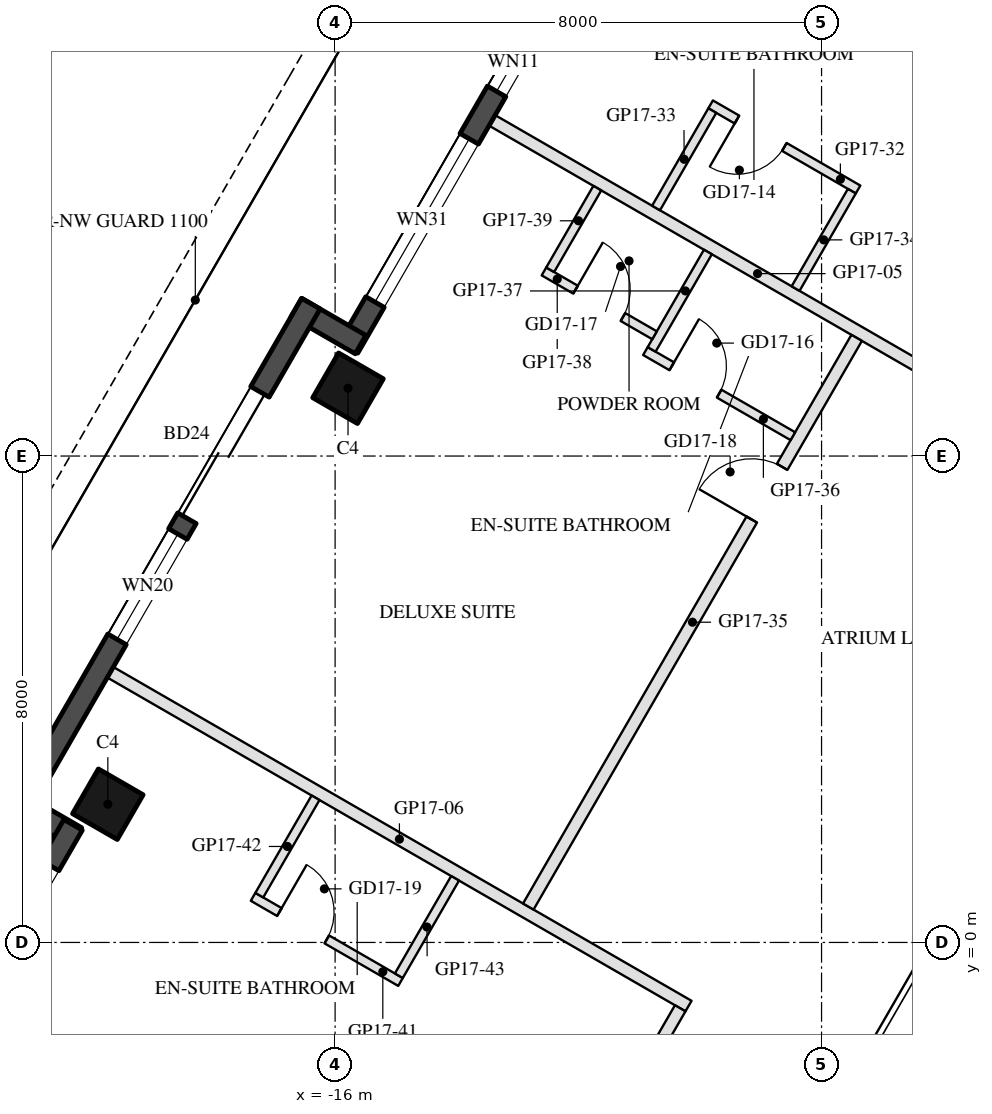
"""IFC4 building model, lengths in metres.
Left out: names, types, materials, properties, quantities, classifications, styles, units other than length and angle.
Written with IfcOpenShell. Run it as: python <this file> out.ifc"""

import sys

from ifc_helpers import new_model, si_unit, direction, frame, frame_2d, origin, origin_2d, place, context, subcontext, project, spatial, rectangle, hollow_rectangle, extrude, element, fill, save


model = new_model("IFC4")
c1 = context("Model", 3, precision=1e-05, world=origin(), true_north=direction((0.0, 1.0)))
c2 = subcontext(c1, "Body", "Model", "MODEL_VIEW")
j1 = project(units=[si_unit("LENGTHUNIT", "METRE"), si_unit("PLANEANGLEUNIT", "RADIAN")], contexts=[c1])
p1 = place(None, origin())
s1 = spatial("IfcSite", under=j1, at=p1, CompositionType="ELEMENT")
p2 = place(p1, origin())
s2 = spatial("IfcBuilding", under=s1, at=p2, CompositionType="ELEMENT")
p3 = place(p2, frame((0.0, 0.0, 183.6)))
s3 = spatial("IfcBuildingStorey", under=s2, at=p3, CompositionType="ELEMENT", Elevation=183.6)
for number, where, z_axis, x_axis in (
    (1, (-15.788, 9.115, 0.0), (0.0, 0.0, 1.0), (0.5, 0.866, 0.0)),
    (2, (-19.738, 2.273, 0.0), (0.0, 0.0, 1.0), (0.5, 0.866, 0.0)),
):
    element("IfcColumn", number, at=place(p3, frame(where, z_axis=z_axis, x_axis=x_axis)), inside=s3, PredefinedType="COLUMN", context=c2, shape_type="SweptSolid", body=[
        extrude(hollow_rectangle(XDim=0.85, YDim=0.85, WallThickness=0.04, at=origin_2d()), origin(), (0.0, 0.0, 1.0), 3.7),
    ])
p4 = place(p3, frame((-12.409, 15.617, 0.0), z_axis=(0.0, 0.0, 1.0), x_axis=(-0.500003597184, -0.866023326939, 0.0)))
e3 = element("IfcWall", 3, at=p4, inside=s3, PredefinedType="SOLIDWALL", context=c2, shape_type="SweptSolid", body=[
    extrude(rectangle(XDim=6.74, YDim=0.35, at=frame_2d((3.37, 0.0))), origin(), (0.0, 0.0, 1.0), 3.55),
])
p5 = place(p4, frame((0.77, 0.0, 0.3)))
e4 = element("IfcOpeningElement", 4, at=p5, cuts=e3, PredefinedType="OPENING", context=c2, shape_type="SweptSolid", body=[
    extrude(rectangle(XDim=1.1, YDim=2.65, at=frame_2d((0.55, 1.325))), frame((0.0, 0.185, 0.0), z_axis=(0.0, -1.0, 0.0), x_axis=(1.0, 0.0, 0.0)), (0.0, 0.0, 1.0), 0.37),
])
p6 = place(p4, frame((2.77, 0.0, 0.3)))
e5 = element("IfcOpeningElement", 5, at=p6, cuts=e3, PredefinedType="OPENING", context=c2, shape_type="SweptSolid", body=[
    extrude(rectangle(XDim=3.1, YDim=2.65, at=frame_2d((1.55, 1.325))), frame((0.0, 0.185, 0.0), z_axis=(0.0, -1.0, 0.0), x_axis=(1.0, 0.0, 0.0)), (0.0, 0.0, 1.0), 0.37),
])
p7 = place(p3, frame((-15.581, 9.833, 0.0), z_axis=(0.0, 0.0, 1.0), x_axis=(-0.866055662726, 0.499947586314, 0.0)))
e6 = element("IfcWall", 6, at=p7, inside=s3, PredefinedType="SOLIDWALL", context=c2, shape_type="SweptSolid", body=[
    extrude(rectangle(XDim=1.22, YDim=0.35, at=frame_2d((0.61, 0.0))), origin(), (0.0, 0.0, 1.0), 3.55),
])
p8 = place(p3, frame((-16.398, 10.507, 0.0), z_axis=(0.0, 0.0, 1.0), x_axis=(-0.499999142773, -0.866025898704, 0.0)))
e7 = element("IfcWall", 7, at=p8, inside=s3, PredefinedType="SOLIDWALL", context=c2, shape_type="SweptSolid", body=[
    extrude(rectangle(XDim=9.7, YDim=0.35, at=frame_2d((4.85, 0.0))), origin(), (0.0, 0.0, 1.0), 3.55),
])
p9 = place(p8, frame((1.675, 0.0, 0.0)))
e8 = element("IfcOpeningElement", 8, at=p9, cuts=e7, PredefinedType="OPENING", context=c2, shape_type="SweptSolid", body=[
    extrude(rectangle(XDim=2.4, YDim=2.4, at=frame_2d((1.2, 1.2))), frame((0.0, 0.185, 0.0), z_axis=(0.0, -1.0, 0.0), x_axis=(1.0, 0.0, 0.0)), (0.0, 0.0, 1.0), 0.37),
])
p10 = place(p8, frame((4.375, 0.0, 0.3)))
e9 = element("IfcOpeningElement", 9, at=p10, cuts=e7, PredefinedType="OPENING", context=c2, shape_type="SweptSolid", body=[
    extrude(rectangle(XDim=2.0, YDim=2.65, at=frame_2d((1.0, 1.325))), frame((0.0, 0.185, 0.0), z_axis=(0.0, -1.0, 0.0), x_axis=(1.0, 0.0, 0.0)), (0.0, 0.0, 1.0), 0.37),
])
p11 = place(p3, frame((-21.312, 2.346, 0.0), z_axis=(0.0, 0.0, 1.0), x_axis=(0.866005645448, -0.500034220881, 0.0)))
e10 = element("IfcWall", 10, at=p11, inside=s3, PredefinedType="SOLIDWALL", context=c2, shape_type="SweptSolid", body=[
    extrude(rectangle(XDim=1.22, YDim=0.35, at=frame_2d((0.61, 0.0))), origin(), (0.0, 0.0, 1.0), 3.55),
])
p12 = place(p3, frame((-20.309, 1.934, 0.0), z_axis=(0.0, 0.0, 1.0), x_axis=(-0.499992114976, -0.866029956157, 0.0)))
e11 = element("IfcWall", 11, at=p12, inside=s3, PredefinedType="SOLIDWALL", context=c2, shape_type="SweptSolid", body=[
    extrude(rectangle(XDim=6.74, YDim=0.35, at=frame_2d((3.37, 0.0))), origin(), (0.0, 0.0, 1.0), 3.55),
])
p13 = place(p12, frame((4.02, 0.0, 0.0)))
e12 = element("IfcOpeningElement", 12, at=p13, cuts=e11, PredefinedType="OPENING", context=c2, shape_type="SweptSolid", body=[
    extrude(rectangle(XDim=2.4, YDim=2.4, at=frame_2d((1.2, 1.2))), frame((0.0, 0.185, 0.0), z_axis=(0.0, -1.0, 0.0), x_axis=(1.0, 0.0, 0.0)), (0.0, 0.0, 1.0), 0.37),
])
p14 = place(p12, frame((0.77, 0.0, 0.3)))
e13 = element("IfcOpeningElement", 13, at=p14, cuts=e11, PredefinedType="OPENING", context=c2, shape_type="SweptSolid", body=[
    extrude(rectangle(XDim=2.9, YDim=2.65, at=frame_2d((1.45, 1.325))), frame((0.0, 0.185, 0.0), z_axis=(0.0, -1.0, 0.0), x_axis=(1.0, 0.0, 0.0)), (0.0, 0.0, 1.0), 0.37),
])
p15 = place(p3, frame((-13.417, 13.52, 0.0), z_axis=(0.0, 0.0, 1.0), x_axis=(0.866022637375, -0.500004791531, 0.0)))
e14 = element("IfcWall", 14, at=p15, inside=s3, PredefinedType="PARTITIONING", context=c2, shape_type="SweptSolid", body=[
    extrude(rectangle(XDim=10.08, YDim=0.2, at=frame_2d((5.04, 0.0))), origin(), (0.0, 0.0, 1.0), 3.06),
])
p16 = place(p3, frame((-19.697, 4.444, 0.0), z_axis=(0.0, 0.0, 1.0), x_axis=(0.866027479907, -0.499996404033, 0.0)))
e15 = element("IfcWall", 15, at=p16, inside=s3, PredefinedType="PARTITIONING", context=c2, shape_type="SweptSolid", body=[
    extrude(rectangle(XDim=10.98, YDim=0.2, at=frame_2d((5.49, 0.0))), origin(), (0.0, 0.0, 1.0), 3.06),
])
p17 = place(p3, frame((-7.399, 12.384, 0.0), z_axis=(0.0, 0.0, 1.0), x_axis=(-0.866034573852, 0.49998411664, 0.0)))
e16 = element("IfcWall", 16, at=p17, inside=s3, PredefinedType="PARTITIONING", context=c2, shape_type="SweptSolid", body=[
    extrude(rectangle(XDim=2.8, YDim=0.15, at=frame_2d((1.4, 0.0))), origin(), (0.0, 0.0, 1.0), 3.55),
])
p18 = place(p17, frame((1.4, 0.0, 0.0)))
e17 = element("IfcOpeningElement", 17, at=p18, cuts=e16, PredefinedType="OPENING", context=c2, shape_type="SweptSolid", body=[
    extrude(rectangle(XDim=0.9, YDim=2.1, at=frame_2d((0.45, 1.05))), frame((0.0, 0.085, 0.0), z_axis=(0.0, -1.0, 0.0), x_axis=(1.0, 0.0, 0.0)), (0.0, 0.0, 1.0), 0.17),
])
for number, where, z_axis, x_axis in (
    (18, (-9.797, 13.681, 0.0), (0.0, 0.0, 1.0), (-0.5, -0.866, 0.0)),
    (19, (-7.502, 12.356, 0.0), (0.0, 0.0, 1.0), (-0.5, -0.866, 0.0)),
):
    element("IfcWall", number, at=place(p3, frame(where, z_axis=z_axis, x_axis=x_axis)), inside=s3, PredefinedType="PARTITIONING", context=c2, shape_type="SweptSolid", body=[
        extrude(rectangle(XDim=1.85, YDim=0.15, at=frame_2d((0.925, 0.0))), origin(), (0.0, 0.0, 1.0), 3.55),
    ])
p19 = place(p3, frame((-12.823, 0.591, 0.0), z_axis=(0.0, 0.0, 1.0), x_axis=(0.500012057535, 0.866018442252, 0.0)))
e20 = element("IfcWall", 20, at=p19, inside=s3, PredefinedType="PARTITIONING", context=c2, shape_type="SweptSolid", body=[
    extrude(rectangle(XDim=10.8, YDim=0.2, at=frame_2d((5.4, 0.0))), origin(), (0.0, 0.0, 1.0), 2.95),
])
p20 = place(p19, frame((7.35, 0.0, 0.0)))
e21 = element("IfcOpeningElement", 21, at=p20, cuts=e20, PredefinedType="OPENING", context=c2, shape_type="SweptSolid", body=[
    extrude(rectangle(XDim=1.0, YDim=2.1, at=frame_2d((0.5, 1.05))), frame((0.0, 0.11, 0.0), z_axis=(0.0, -1.0, 0.0), x_axis=(1.0, 0.0, 0.0)), (0.0, 0.0, 1.0), 0.22),
])
p21 = place(p3, frame((-10.897, 9.726, 0.0), z_axis=(0.0, 0.0, 1.0), x_axis=(0.866056369097, -0.49994636267, 0.0)))
e22 = element("IfcWall", 22, at=p21, inside=s3, PredefinedType="PARTITIONING", context=c2, shape_type="SweptSolid", body=[
    extrude(rectangle(XDim=2.8, YDim=0.15, at=frame_2d((1.4, 0.0))), origin(), (0.0, 0.0, 1.0), 3.55),
])
p22 = place(p21, frame((0.5, 0.0, 0.0)))
e23 = element("IfcOpeningElement", 23, at=p22, cuts=e22, PredefinedType="OPENING", context=c2, shape_type="SweptSolid", body=[
    extrude(rectangle(XDim=0.9, YDim=2.1, at=frame_2d((0.45, 1.05))), frame((0.0, 0.085, 0.0), z_axis=(0.0, -1.0, 0.0), x_axis=(1.0, 0.0, 0.0)), (0.0, 0.0, 1.0), 0.17),
])
p23 = place(p3, frame((-9.869, 11.356, 0.0), z_axis=(0.0, 0.0, 1.0), x_axis=(-0.500042316284, -0.866000971088, 0.0)))
e24 = element("IfcWall", 24, at=p23, inside=s3, PredefinedType="PARTITIONING", context=c2, shape_type="SweptSolid", body=[
    extrude(rectangle(XDim=1.85, YDim=0.15, at=frame_2d((0.925, 0.0))), origin(), (0.0, 0.0, 1.0), 2.95),
])
p24 = place(p3, frame((-12.565, 11.036, 0.0), z_axis=(0.0, 0.0, 1.0), x_axis=(0.866009402589, -0.500027713859, 0.0)))
e25 = element("IfcWall", 25, at=p24, inside=s3, PredefinedType="PARTITIONING", context=c2, shape_type="SweptSolid", body=[
    extrude(rectangle(XDim=2.1, YDim=0.15, at=frame_2d((1.05, 0.0))), origin(), (0.0, 0.0, 1.0), 3.55),
])
p25 = place(p24, frame((0.6, 0.0, 0.0)))
e26 = element("IfcOpeningElement", 26, at=p25, cuts=e25, PredefinedType="OPENING", context=c2, shape_type="SweptSolid", body=[
    extrude(rectangle(XDim=0.9, YDim=2.1, at=frame_2d((0.45, 1.05))), frame((0.0, 0.085, 0.0), z_axis=(0.0, -1.0, 0.0), x_axis=(1.0, 0.0, 0.0)), (0.0, 0.0, 1.0), 0.17),
])
p26 = place(p3, frame((-11.688, 12.406, 0.0), z_axis=(0.0, 0.0, 1.0), x_axis=(-0.499967891604, -0.866043940782, 0.0)))
e27 = element("IfcWall", 27, at=p26, inside=s3, PredefinedType="PARTITIONING", context=c2, shape_type="SweptSolid", body=[
    extrude(rectangle(XDim=1.55, YDim=0.15, at=frame_2d((0.775, 0.0))), origin(), (0.0, 0.0, 1.0), 2.95),
])
p27 = place(p3, frame((-12.269, -4.45, 0.0), z_axis=(0.0, 0.0, 1.0), x_axis=(0.500008716408, 0.866020371305, 0.0)))
e28 = element("IfcWall", 28, at=p27, inside=s3, PredefinedType="PARTITIONING", context=c2, shape_type="SweptSolid", body=[
    extrude(rectangle(XDim=3.888, YDim=0.2, at=frame_2d((1.944, 0.0))), origin(), (0.0, 0.0, 1.0), 2.95),
])
p28 = place(p27, frame((1.444, 0.0, 0.0)))
e29 = element("IfcOpeningElement", 29, at=p28, cuts=e28, PredefinedType="OPENING", context=c2, shape_type="SweptSolid", body=[
    extrude(rectangle(XDim=1.0, YDim=2.1, at=frame_2d((0.5, 1.05))), frame((0.0, 0.11, 0.0), z_axis=(0.0, -1.0, 0.0), x_axis=(1.0, 0.0, 0.0)), (0.0, 0.0, 1.0), 0.22),
])
p29 = place(p3, frame((-17.349, 0.75, 0.0), z_axis=(0.0, 0.0, 1.0), x_axis=(0.866056369097, -0.49994636267, 0.0)))
e30 = element("IfcWall", 30, at=p29, inside=s3, PredefinedType="PARTITIONING", context=c2, shape_type="SweptSolid", body=[
    extrude(rectangle(XDim=2.8, YDim=0.15, at=frame_2d((1.4, 0.0))), origin(), (0.0, 0.0, 1.0), 2.95),
])
p30 = place(p29, frame((0.5, 0.0, 0.0)))
e31 = element("IfcOpeningElement", 31, at=p30, cuts=e30, PredefinedType="OPENING", context=c2, shape_type="SweptSolid", body=[
    extrude(rectangle(XDim=0.9, YDim=2.1, at=frame_2d((0.45, 1.05))), frame((0.0, 0.085, 0.0), z_axis=(0.0, -1.0, 0.0), x_axis=(1.0, 0.0, 0.0)), (0.0, 0.0, 1.0), 0.17),
])
for number, where, z_axis, x_axis in (
    (32, (-16.322, 2.38, 0.0), (0.0, 0.0, 1.0), (-0.5, -0.866, 0.0)),
    (33, (-14.027, 1.055, 0.0), (0.0, 0.0, 1.0), (-0.5, -0.866, 0.0)),
):
    element("IfcWall", number, at=place(p3, frame(where, z_axis=z_axis, x_axis=x_axis)), inside=s3, PredefinedType="PARTITIONING", context=c2, shape_type="SweptSolid", body=[
        extrude(rectangle(XDim=1.85, YDim=0.15, at=frame_2d((0.925, 0.0))), origin(), (0.0, 0.0, 1.0), 2.95),
    ])
p31 = place(p5, origin())
e34 = element("IfcWindow", 34, at=p31, inside=s3, PartitioningType="SINGLE_PANEL", PredefinedType="WINDOW", context=c2, shape_type="SweptSolid", body=[
    extrude(rectangle(XDim=1.1, YDim=2.65, at=frame_2d((0.55, 1.325))), frame((0.0, 0.03, 0.0), z_axis=(0.0, -1.0, 0.0), x_axis=(1.0, 0.0, 0.0)), (0.0, 0.0, 1.0), 0.06),
])
fill(e4, e34)
p32 = place(p6, origin())
e35 = element("IfcWindow", 35, at=p32, inside=s3, PartitioningType="SINGLE_PANEL", PredefinedType="WINDOW", context=c2, shape_type="SweptSolid", body=[
    extrude(rectangle(XDim=3.1, YDim=2.65, at=frame_2d((1.55, 1.325))), frame((0.0, 0.03, 0.0), z_axis=(0.0, -1.0, 0.0), x_axis=(1.0, 0.0, 0.0)), (0.0, 0.0, 1.0), 0.06),
])
fill(e5, e35)
p33 = place(p9, frame((2.4, 0.0, 0.0), z_axis=(0.0, 0.0, 1.0), x_axis=(-1.0, 0.0, 0.0)))
e36 = element("IfcDoor", 36, at=p33, inside=s3, OperationType="SLIDING_TO_LEFT", PredefinedType="DOOR", context=c2, shape_type="SweptSolid", body=[
    extrude(rectangle(XDim=2.4, YDim=2.4, at=frame_2d((1.2, 1.2))), frame((0.0, 0.025, 0.0), z_axis=(0.0, -1.0, 0.0), x_axis=(1.0, 0.0, 0.0)), (0.0, 0.0, 1.0), 0.05),
])
fill(e8, e36)
p34 = place(p10, origin())
e37 = element("IfcWindow", 37, at=p34, inside=s3, PartitioningType="SINGLE_PANEL", PredefinedType="WINDOW", context=c2, shape_type="SweptSolid", body=[
    extrude(rectangle(XDim=2.0, YDim=2.65, at=frame_2d((1.0, 1.325))), frame((0.0, 0.03, 0.0), z_axis=(0.0, -1.0, 0.0), x_axis=(1.0, 0.0, 0.0)), (0.0, 0.0, 1.0), 0.06),
])
fill(e9, e37)
p35 = place(p18, origin())
e38 = element("IfcDoor", 38, at=p35, inside=s3, OperationType="SINGLE_SWING_RIGHT", PredefinedType="DOOR", context=c2, shape_type="SweptSolid", body=[
    extrude(rectangle(XDim=0.9, YDim=2.1, at=frame_2d((0.45, 1.05))), frame((0.0, 0.025, 0.0), z_axis=(0.0, -1.0, 0.0), x_axis=(1.0, 0.0, 0.0)), (0.0, 0.0, 1.0), 0.05),
])
fill(e17, e38)
p36 = place(p22, origin())
e39 = element("IfcDoor", 39, at=p36, inside=s3, OperationType="SINGLE_SWING_LEFT", PredefinedType="DOOR", context=c2, shape_type="SweptSolid", body=[
    extrude(rectangle(XDim=0.9, YDim=2.1, at=frame_2d((0.45, 1.05))), frame((0.0, 0.025, 0.0), z_axis=(0.0, -1.0, 0.0), x_axis=(1.0, 0.0, 0.0)), (0.0, 0.0, 1.0), 0.05),
])
fill(e23, e39)
p37 = place(p25, origin())
e40 = element("IfcDoor", 40, at=p37, inside=s3, OperationType="SINGLE_SWING_LEFT", PredefinedType="DOOR", context=c2, shape_type="SweptSolid", body=[
    extrude(rectangle(XDim=0.9, YDim=2.1, at=frame_2d((0.45, 1.05))), frame((0.0, 0.025, 0.0), z_axis=(0.0, -1.0, 0.0), x_axis=(1.0, 0.0, 0.0)), (0.0, 0.0, 1.0), 0.05),
])
fill(e26, e40)
p38 = place(p20, origin())
e41 = element("IfcDoor", 41, at=p38, inside=s3, OperationType="SINGLE_SWING_LEFT", PredefinedType="DOOR", context=c2, shape_type="SweptSolid", body=[
    extrude(rectangle(XDim=1.0, YDim=2.1, at=frame_2d((0.5, 1.05))), frame((0.0, 0.025, 0.0), z_axis=(0.0, -1.0, 0.0), x_axis=(1.0, 0.0, 0.0)), (0.0, 0.0, 1.0), 0.05),
])
fill(e21, e41)
p39 = place(p30, origin())
e42 = element("IfcDoor", 42, at=p39, inside=s3, OperationType="SINGLE_SWING_LEFT", PredefinedType="DOOR", context=c2, shape_type="SweptSolid", body=[
    extrude(rectangle(XDim=0.9, YDim=2.1, at=frame_2d((0.45, 1.05))), frame((0.0, 0.025, 0.0), z_axis=(0.0, -1.0, 0.0), x_axis=(1.0, 0.0, 0.0)), (0.0, 0.0, 1.0), 0.05),
])
fill(e31, e42)
save(model, sys.argv[1])
